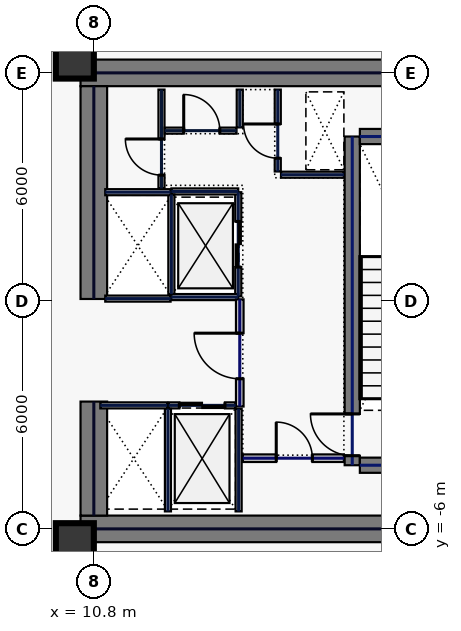
"""IFC4 building model, lengths in metres.
Left out: names, types, materials, properties, quantities, classifications, styles, units other than length and angle.
Written with IfcOpenShell. Run it as: python <this file> out.ifc"""

import sys

from ifc_helpers import new_model, si_unit, direction, frame, frame_2d, origin, origin_2d, place, context, subcontext, project, spatial, rectangle, hollow_rectangle, extrude, element, fill, save


model = new_model("IFC4")
c1 = context("Model", 3, precision=1e-05, world=origin(), true_north=direction((0.0, 1.0)))
c2 = subcontext(c1, "Body", "Model", "MODEL_VIEW")
j1 = project(units=[si_unit("LENGTHUNIT", "METRE"), si_unit("PLANEANGLEUNIT", "RADIAN")], contexts=[c1])
p1 = place(None, origin())
s1 = spatial("IfcSite", under=j1, at=p1, CompositionType="ELEMENT")
p2 = place(p1, origin())
s2 = spatial("IfcBuilding", under=s1, at=p2, CompositionType="ELEMENT")
p3 = place(p2, frame((0.0, 0.0, 101.4)))
s3 = spatial("IfcBuildingStorey", under=s2, at=p3, CompositionType="ELEMENT", Elevation=101.4)
for number, where, z_axis, x_axis in (
    (1, (10.45, 6.0, 0.0), (0.0, 0.0, 1.0), (1.0, 0.0, 0.0)),
    (2, (10.45, -6.0, 0.0), (0.0, 0.0, 1.0), (1.0, 0.0, 0.0)),
):
    element("IfcWall", number, at=place(p3, frame(where, z_axis=z_axis, x_axis=x_axis)), inside=s3, PredefinedType="SHEAR", context=c2, shape_type="SweptSolid", body=[
        extrude(rectangle(XDim=11.55, YDim=0.7, at=frame_2d((5.775, 0.0))), origin(), (0.0, 0.0, 1.0), 3.74),
    ])
p4 = place(p3, frame((10.8, -5.65, 0.0), z_axis=(0.0, 0.0, 1.0), x_axis=(0.0, 1.0, 0.0)))
e3 = element("IfcWall", 3, at=p4, inside=s3, PredefinedType="SHEAR", context=c2, shape_type="SweptSolid", body=[
    extrude(rectangle(XDim=3.0, YDim=0.7, at=frame_2d((1.5, 0.0))), origin(), (0.0, 0.0, 1.0), 3.74),
])
p5 = place(p3, frame((10.8, 0.05, 0.0), z_axis=(0.0, 0.0, 1.0), x_axis=(0.0, 1.0, 0.0)))
e4 = element("IfcWall", 4, at=p5, inside=s3, PredefinedType="SHEAR", context=c2, shape_type="SweptSolid", body=[
    extrude(rectangle(XDim=5.6, YDim=0.7, at=frame_2d((2.8, 0.0))), origin(), (0.0, 0.0, 1.0), 3.74),
])
p6 = place(p3, frame((17.6, -4.325, 0.0), z_axis=(0.0, 0.0, 1.0), x_axis=(0.0, 1.0, 0.0)))
e5 = element("IfcWall", 5, at=p6, inside=s3, PredefinedType="SHEAR", context=c2, shape_type="SweptSolid", body=[
    extrude(rectangle(XDim=8.65, YDim=0.4, at=frame_2d((4.325, 0.0))), origin(), (0.0, 0.0, 1.0), 3.74),
])
p7 = place(p6, frame((0.25, 0.0, 0.0)))
e6 = element("IfcOpeningElement", 6, at=p7, cuts=e5, PredefinedType="OPENING", context=c2, shape_type="SweptSolid", body=[
    extrude(rectangle(XDim=1.1, YDim=2.2, at=frame_2d((0.55, 1.1))), frame((0.0, 0.21, 0.0), z_axis=(0.0, -1.0, 0.0), x_axis=(1.0, 0.0, 0.0)), (0.0, 0.0, 1.0), 0.42),
])
for number, where, z_axis, x_axis in (
    (7, (17.8, -4.325, 0.0), (0.0, 0.0, 1.0), (1.0, 0.0, 0.0)),
    (8, (17.8, 4.325, 0.0), (0.0, 0.0, 1.0), (1.0, 0.0, 0.0)),
):
    element("IfcWall", number, at=place(p3, frame(where, z_axis=z_axis, x_axis=x_axis)), inside=s3, PredefinedType="SHEAR", context=c2, shape_type="SweptSolid", body=[
        extrude(rectangle(XDim=3.4, YDim=0.4, at=frame_2d((1.7, 0.0))), origin(), (0.0, 0.0, 1.0), 3.74),
    ])
for number, where, z_axis, x_axis in (
    (9, (10.3, -6.35, 0.0), (0.0, 0.0, 1.0), (1.0, 0.0, 0.0)),
    (10, (10.3, 6.35, 0.0), (0.0, 0.0, 1.0), (1.0, 0.0, 0.0)),
):
    element("IfcColumn", number, at=place(p3, frame(where, z_axis=z_axis, x_axis=x_axis)), inside=s3, PredefinedType="COLUMN", context=c2, shape_type="SweptSolid", body=[
        extrude(hollow_rectangle(XDim=1.0, YDim=1.0, WallThickness=0.045, at=origin_2d()), origin(), (0.0, 0.0, 1.0), 3.74),
    ])
p8 = place(p3, frame((14.6, 0.12, 0.0), z_axis=(0.0, 0.0, 1.0), x_axis=(0.0, 1.0, 0.0)))
e11 = element("IfcWall", 11, at=p8, inside=s3, PredefinedType="PARTITIONING", context=c2, shape_type="SweptSolid", body=[
    extrude(rectangle(XDim=2.74, YDim=0.16, at=frame_2d((1.37, 0.0))), origin(), (0.0, 0.0, 1.0), 3.74),
])
p9 = place(p8, frame((0.77, 0.0, 0.0)))
e12 = element("IfcOpeningElement", 12, at=p9, cuts=e11, PredefinedType="OPENING", context=c2, shape_type="SweptSolid", body=[
    extrude(rectangle(XDim=1.2, YDim=2.2, at=frame_2d((0.6, 1.1))), frame((0.0, 0.09, 0.0), z_axis=(0.0, -1.0, 0.0), x_axis=(1.0, 0.0, 0.0)), (0.0, 0.0, 1.0), 0.18),
])
for number, where, z_axis, x_axis in (
    (13, (12.84, 0.1, 0.0), (0.0, 0.0, 1.0), (1.0, 0.0, 0.0)),
    (14, (12.84, 2.88, 0.0), (0.0, 0.0, 1.0), (1.0, 0.0, 0.0)),
):
    element("IfcWall", number, at=place(p3, frame(where, z_axis=z_axis, x_axis=x_axis)), inside=s3, PredefinedType="PARTITIONING", context=c2, shape_type="SweptSolid", body=[
        extrude(rectangle(XDim=1.76, YDim=0.16, at=frame_2d((0.88, 0.0))), origin(), (0.0, 0.0, 1.0), 3.74),
    ])
p10 = place(p3, frame((12.84, 0.18, 0.0), z_axis=(0.0, 0.0, 1.0), x_axis=(0.0, 1.0, 0.0)))
e15 = element("IfcWall", 15, at=p10, inside=s3, PredefinedType="PARTITIONING", context=c2, shape_type="SweptSolid", body=[
    extrude(rectangle(XDim=2.62, YDim=0.16, at=frame_2d((1.31, 0.0))), origin(), (0.0, 0.0, 1.0), 3.74),
])
p11 = place(p3, frame((12.77, -2.75, 0.0), z_axis=(0.0, 0.0, 1.0), x_axis=(1.0, 0.0, 0.0)))
e16 = element("IfcWall", 16, at=p11, inside=s3, PredefinedType="PARTITIONING", context=c2, shape_type="SweptSolid", body=[
    extrude(rectangle(XDim=1.76, YDim=0.16, at=frame_2d((0.88, 0.0))), origin(), (0.0, 0.0, 1.0), 3.74),
])
p12 = place(p11, frame((0.28, 0.0, 0.0)))
e17 = element("IfcOpeningElement", 17, at=p12, cuts=e16, PredefinedType="OPENING", context=c2, shape_type="SweptSolid", body=[
    extrude(rectangle(XDim=1.2, YDim=2.2, at=frame_2d((0.6, 1.1))), frame((0.0, 0.09, 0.0), z_axis=(0.0, -1.0, 0.0), x_axis=(1.0, 0.0, 0.0)), (0.0, 0.0, 1.0), 0.18),
])
for number, where, z_axis, x_axis in (
    (18, (12.75, -5.54, 0.0), (0.0, 0.0, 1.0), (0.0, 1.0, 0.0)),
    (19, (14.61, -5.54, 0.0), (0.0, 0.0, 1.0), (0.0, 1.0, 0.0)),
):
    element("IfcWall", number, at=place(p3, frame(where, z_axis=z_axis, x_axis=x_axis)), inside=s3, PredefinedType="PARTITIONING", context=c2, shape_type="SweptSolid", body=[
        extrude(rectangle(XDim=2.7, YDim=0.16, at=frame_2d((1.35, 0.0))), origin(), (0.0, 0.0, 1.0), 3.74),
    ])
p13 = place(p3, frame((10.97, -2.75, 0.0), z_axis=(0.0, 0.0, 1.0), x_axis=(1.0, 0.0, 0.0)))
e20 = element("IfcWall", 20, at=p13, inside=s3, PredefinedType="PARTITIONING", context=c2, shape_type="SweptSolid", body=[
    extrude(rectangle(XDim=1.76, YDim=0.16, at=frame_2d((0.88, 0.0))), origin(), (0.0, 0.0, 1.0), 3.74),
])
for number, where, z_axis, x_axis in (
    (21, (11.1, 0.06, 0.0), (0.0, 0.0, 1.0), (1.0, 0.0, 0.0)),
    (22, (11.1, 2.86, 0.0), (0.0, 0.0, 1.0), (1.0, 0.0, 0.0)),
):
    element("IfcWall", number, at=place(p3, frame(where, z_axis=z_axis, x_axis=x_axis)), inside=s3, PredefinedType="PARTITIONING", context=c2, shape_type="SweptSolid", body=[
        extrude(rectangle(XDim=1.72, YDim=0.16, at=frame_2d((0.86, 0.0))), origin(), (0.0, 0.0, 1.0), 3.74),
    ])
p14 = place(p3, frame((15.64, 3.405, 0.0), z_axis=(0.0, 0.0, 1.0), x_axis=(0.0, 1.0, 0.0)))
e23 = element("IfcWall", 23, at=p14, inside=s3, PredefinedType="PARTITIONING", context=c2, shape_type="SweptSolid", body=[
    extrude(rectangle(XDim=2.155, YDim=0.16, at=frame_2d((1.078, 0.0))), origin(), (0.0, 0.0, 1.0), 3.74),
])
p15 = place(p14, frame((0.35, 0.0, 0.0)))
e24 = element("IfcOpeningElement", 24, at=p15, cuts=e23, PredefinedType="OPENING", context=c2, shape_type="SweptSolid", body=[
    extrude(rectangle(XDim=0.9, YDim=2.2, at=frame_2d((0.45, 1.1))), frame((0.0, 0.09, 0.0), z_axis=(0.0, -1.0, 0.0), x_axis=(1.0, 0.0, 0.0)), (0.0, 0.0, 1.0), 0.18),
])
p16 = place(p3, frame((15.725, 3.32, 0.0), z_axis=(0.0, 0.0, 1.0), x_axis=(1.0, 0.0, 0.0)))
e25 = element("IfcWall", 25, at=p16, inside=s3, PredefinedType="PARTITIONING", context=c2, shape_type="SweptSolid", body=[
    extrude(rectangle(XDim=1.655, YDim=0.16, at=frame_2d((0.827, 0.0))), origin(), (0.0, 0.0, 1.0), 3.74),
])
p17 = place(p3, frame((14.72, -4.14, 0.0), z_axis=(0.0, 0.0, 1.0), x_axis=(1.0, 0.0, 0.0)))
e26 = element("IfcWall", 26, at=p17, inside=s3, PredefinedType="SOLIDWALL", context=c2, shape_type="SweptSolid", body=[
    extrude(rectangle(XDim=2.66, YDim=0.2, at=frame_2d((1.33, 0.0))), origin(), (0.0, 0.0, 1.0), 3.74),
])
p18 = place(p17, frame((0.88, 0.0, 0.0)))
e27 = element("IfcOpeningElement", 27, at=p18, cuts=e26, PredefinedType="OPENING", context=c2, shape_type="SweptSolid", body=[
    extrude(rectangle(XDim=0.95, YDim=2.2, at=frame_2d((0.475, 1.1))), frame((0.0, 0.11, 0.0), z_axis=(0.0, -1.0, 0.0), x_axis=(1.0, 0.0, 0.0)), (0.0, 0.0, 1.0), 0.22),
])
p19 = place(p3, frame((12.58, 2.96, 0.0), z_axis=(0.0, 0.0, 1.0), x_axis=(0.0, 1.0, 0.0)))
e28 = element("IfcWall", 28, at=p19, inside=s3, PredefinedType="PARTITIONING", context=c2, shape_type="SweptSolid", body=[
    extrude(rectangle(XDim=2.6, YDim=0.16, at=frame_2d((1.3, 0.0))), origin(), (0.0, 0.0, 1.0), 3.74),
])
p20 = place(p19, frame((0.35, 0.0, 0.0)))
e29 = element("IfcOpeningElement", 29, at=p20, cuts=e28, PredefinedType="OPENING", context=c2, shape_type="SweptSolid", body=[
    extrude(rectangle(XDim=0.95, YDim=2.2, at=frame_2d((0.475, 1.1))), frame((0.0, 0.09, 0.0), z_axis=(0.0, -1.0, 0.0), x_axis=(1.0, 0.0, 0.0)), (0.0, 0.0, 1.0), 0.18),
])
p21 = place(p3, frame((12.665, 4.48, 0.0), z_axis=(0.0, 0.0, 1.0), x_axis=(1.0, 0.0, 0.0)))
e30 = element("IfcWall", 30, at=p21, inside=s3, PredefinedType="PARTITIONING", context=c2, shape_type="SweptSolid", body=[
    extrude(rectangle(XDim=1.89, YDim=0.16, at=frame_2d((0.945, 0.0))), origin(), (0.0, 0.0, 1.0), 3.74),
])
p22 = place(p21, frame((0.5, 0.0, 0.0)))
e31 = element("IfcOpeningElement", 31, at=p22, cuts=e30, PredefinedType="OPENING", context=c2, shape_type="SweptSolid", body=[
    extrude(rectangle(XDim=0.95, YDim=2.2, at=frame_2d((0.475, 1.1))), frame((0.0, 0.09, 0.0), z_axis=(0.0, -1.0, 0.0), x_axis=(1.0, 0.0, 0.0)), (0.0, 0.0, 1.0), 0.18),
])
p23 = place(p3, frame((14.64, 4.565, 0.0), z_axis=(0.0, 0.0, 1.0), x_axis=(0.0, 1.0, 0.0)))
e32 = element("IfcWall", 32, at=p23, inside=s3, PredefinedType="PARTITIONING", context=c2, shape_type="SweptSolid", body=[
    extrude(rectangle(XDim=0.995, YDim=0.16, at=frame_2d((0.498, 0.0))), origin(), (0.0, 0.0, 1.0), 3.74),
])
p24 = place(p3, frame((14.64, -2.78, 0.0), z_axis=(0.0, 0.0, 1.0), x_axis=(0.0, 1.0, 0.0)))
e33 = element("IfcWall", 33, at=p24, inside=s3, PredefinedType="SOLIDWALL", context=c2, shape_type="SweptSolid", body=[
    extrude(rectangle(XDim=2.82, YDim=0.2, at=frame_2d((1.41, 0.0))), origin(), (0.0, 0.0, 1.0), 3.74),
])
p25 = place(p24, frame((0.73, 0.0, 0.0)))
e34 = element("IfcOpeningElement", 34, at=p25, cuts=e33, PredefinedType="OPENING", context=c2, shape_type="SweptSolid", body=[
    extrude(rectangle(XDim=1.2, YDim=2.2, at=frame_2d((0.6, 1.1))), frame((0.0, 0.11, 0.0), z_axis=(0.0, -1.0, 0.0), x_axis=(1.0, 0.0, 0.0)), (0.0, 0.0, 1.0), 0.22),
])
p26 = place(p3, frame((10.58, 7.435, 0.0), z_axis=(0.0, 0.0, 1.0), x_axis=(0.0, -1.0, 0.0)))
e35 = element("IfcWall", 35, at=p26, inside=s3, PredefinedType="PARTITIONING", context=c2, shape_type="SweptSolid", body=[
    extrude(rectangle(XDim=1.015, YDim=0.16, at=frame_2d((0.508, 0.0))), origin(), (0.0, 0.0, 1.0), 3.74),
])
p27 = place(p3, frame((10.58, -6.42, 0.0), z_axis=(0.0, 0.0, 1.0), x_axis=(0.0, -1.0, 0.0)))
e36 = element("IfcWall", 36, at=p27, inside=s3, PredefinedType="PARTITIONING", context=c2, shape_type="SweptSolid", body=[
    extrude(rectangle(XDim=0.965, YDim=0.16, at=frame_2d((0.482, 0.0))), origin(), (0.0, 0.0, 1.0), 3.74),
])
p28 = place(p7, origin())
e37 = element("IfcDoor", 37, at=p28, inside=s3, OperationType="SINGLE_SWING_RIGHT", PredefinedType="DOOR", context=c2, shape_type="SweptSolid", body=[
    extrude(rectangle(XDim=1.1, YDim=2.2, at=frame_2d((0.55, 1.1))), frame((0.0, 0.025, 0.0), z_axis=(0.0, -1.0, 0.0), x_axis=(1.0, 0.0, 0.0)), (0.0, 0.0, 1.0), 0.05),
])
fill(e6, e37)
p29 = place(p9, origin())
e38 = element("IfcDoor", 38, at=p29, inside=s3, OperationType="SLIDING_TO_LEFT", PredefinedType="DOOR", context=c2, shape_type="SweptSolid", body=[
    extrude(rectangle(XDim=1.2, YDim=2.2, at=frame_2d((0.6, 1.1))), frame((0.0, 0.025, 0.0), z_axis=(0.0, -1.0, 0.0), x_axis=(1.0, 0.0, 0.0)), (0.0, 0.0, 1.0), 0.05),
])
fill(e12, e38)
p30 = place(p12, origin())
e39 = element("IfcDoor", 39, at=p30, inside=s3, OperationType="SLIDING_TO_LEFT", PredefinedType="DOOR", context=c2, shape_type="SweptSolid", body=[
    extrude(rectangle(XDim=1.2, YDim=2.2, at=frame_2d((0.6, 1.1))), frame((0.0, 0.025, 0.0), z_axis=(0.0, -1.0, 0.0), x_axis=(1.0, 0.0, 0.0)), (0.0, 0.0, 1.0), 0.05),
])
fill(e17, e39)
p31 = place(p15, origin())
e40 = element("IfcDoor", 40, at=p31, inside=s3, OperationType="SINGLE_SWING_RIGHT", PredefinedType="DOOR", context=c2, shape_type="SweptSolid", body=[
    extrude(rectangle(XDim=0.9, YDim=2.2, at=frame_2d((0.45, 1.1))), frame((0.0, 0.025, 0.0), z_axis=(0.0, -1.0, 0.0), x_axis=(1.0, 0.0, 0.0)), (0.0, 0.0, 1.0), 0.05),
])
fill(e24, e40)
p32 = place(p18, origin())
e41 = element("IfcDoor", 41, at=p32, inside=s3, OperationType="SINGLE_SWING_LEFT", PredefinedType="DOOR", context=c2, shape_type="SweptSolid", body=[
    extrude(rectangle(XDim=0.95, YDim=2.2, at=frame_2d((0.475, 1.1))), frame((0.0, 0.025, 0.0), z_axis=(0.0, -1.0, 0.0), x_axis=(1.0, 0.0, 0.0)), (0.0, 0.0, 1.0), 0.05),
])
fill(e27, e41)
p33 = place(p20, origin())
e42 = element("IfcDoor", 42, at=p33, inside=s3, OperationType="SINGLE_SWING_RIGHT", PredefinedType="DOOR", context=c2, shape_type="SweptSolid", body=[
    extrude(rectangle(XDim=0.95, YDim=2.2, at=frame_2d((0.475, 1.1))), frame((0.0, 0.025, 0.0), z_axis=(0.0, -1.0, 0.0), x_axis=(1.0, 0.0, 0.0)), (0.0, 0.0, 1.0), 0.05),
])
fill(e29, e42)
p34 = place(p22, origin())
e43 = element("IfcDoor", 43, at=p34, inside=s3, OperationType="SINGLE_SWING_LEFT", PredefinedType="DOOR", context=c2, shape_type="SweptSolid", body=[
    extrude(rectangle(XDim=0.95, YDim=2.2, at=frame_2d((0.475, 1.1))), frame((0.0, 0.025, 0.0), z_axis=(0.0, -1.0, 0.0), x_axis=(1.0, 0.0, 0.0)), (0.0, 0.0, 1.0), 0.05),
])
fill(e31, e43)
p35 = place(p25, origin())
e44 = element("IfcDoor", 44, at=p35, inside=s3, OperationType="SINGLE_SWING_RIGHT", PredefinedType="DOOR", context=c2, shape_type="SweptSolid", body=[
    extrude(rectangle(XDim=1.2, YDim=2.2, at=frame_2d((0.6, 1.1))), frame((0.0, 0.025, 0.0), z_axis=(0.0, -1.0, 0.0), x_axis=(1.0, 0.0, 0.0)), (0.0, 0.0, 1.0), 0.05),
])
fill(e34, e44)
save(model, sys.argv[1])
